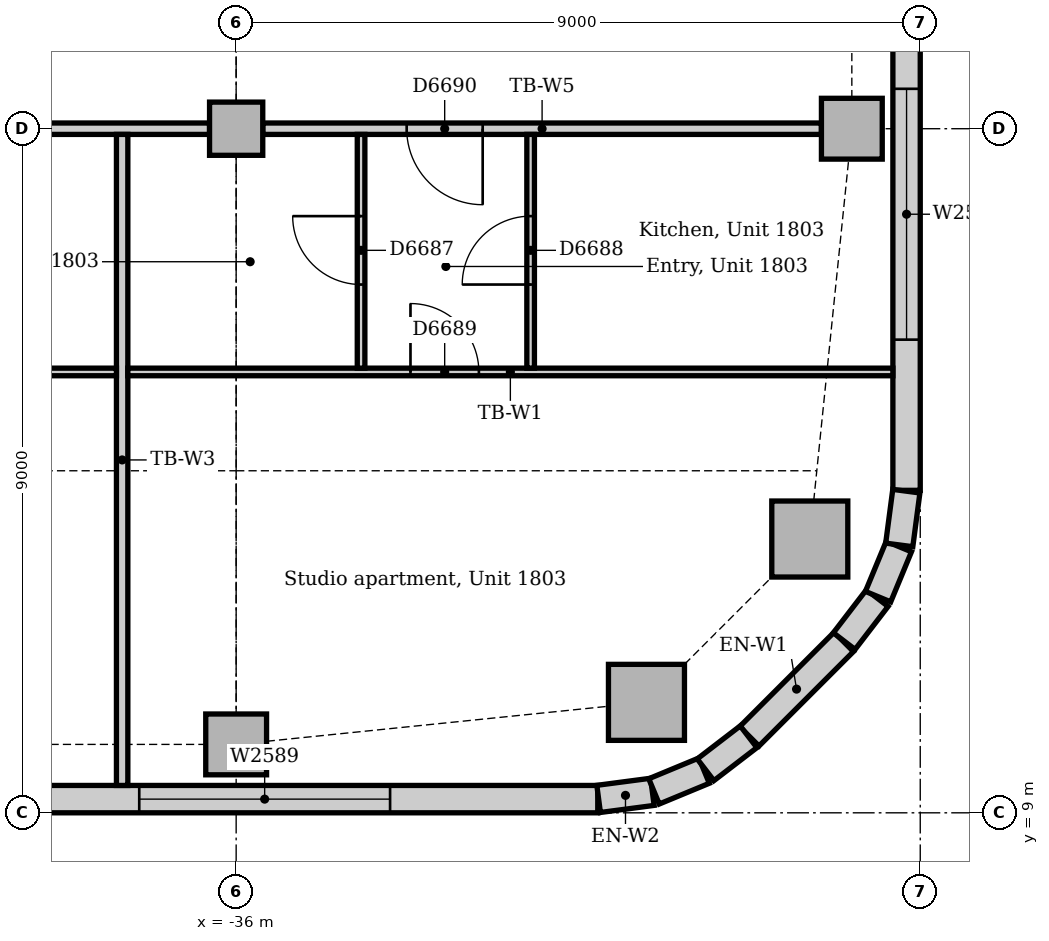
"""IFC4 building model, lengths in metres.
Left out: names, types, materials, properties, quantities, classifications, styles, units other than length and angle.
Written with IfcOpenShell. Run it as: python <this file> out.ifc"""

import sys

from ifc_helpers import new_model, si_unit, direction, frame, frame_2d, origin, origin_2d, place, context, subcontext, project, spatial, rectangle, extrude, element, fill, save


model = new_model("IFC4")
c1 = context("Model", 3, precision=1e-05, world=origin(), true_north=direction((0.0, 1.0)))
c2 = subcontext(c1, "Body", "Model", "MODEL_VIEW")
j1 = project(units=[si_unit("LENGTHUNIT", "METRE"), si_unit("PLANEANGLEUNIT", "RADIAN")], contexts=[c1])
p1 = place(None, origin())
s1 = spatial("IfcSite", under=j1, at=p1, CompositionType="ELEMENT")
p2 = place(p1, origin())
s2 = spatial("IfcBuilding", under=s1, at=p2, CompositionType="ELEMENT")
p3 = place(p2, frame((0.0, 0.0, 79.0)))
s3 = spatial("IfcBuildingStorey", under=s2, at=p3, CompositionType="ELEMENT", Elevation=79.0)
for number, where, z_axis, x_axis in (
    (1, (-30.602, 10.453, 0.0), (0.0, 0.0, 1.0), (1.0, 0.0, 0.0)),
    (2, (-28.453, 12.602, 0.0), (0.0, 0.0, 1.0), (1.0, 0.0, 0.0)),
):
    element("IfcColumn", number, at=place(p3, frame(where, z_axis=z_axis, x_axis=x_axis)), inside=s3, PredefinedType="COLUMN", context=c2, shape_type="SweptSolid", body=[
        extrude(rectangle(XDim=1.0, YDim=1.0, at=origin_2d()), origin(), (0.0, 0.0, 1.0), 3.85),
    ])
for number, where, z_axis, x_axis in (
    (3, (-36.0, 9.9, 0.0), (0.0, 0.0, 1.0), (1.0, 0.0, 0.0)),
    (4, (-27.9, 18.0, 0.0), (0.0, 0.0, 1.0), (1.0, 0.0, 0.0)),
):
    element("IfcColumn", number, at=place(p3, frame(where, z_axis=z_axis, x_axis=x_axis)), inside=s3, PredefinedType="COLUMN", context=c2, shape_type="SweptSolid", body=[
        extrude(rectangle(XDim=0.8, YDim=0.8, at=origin_2d()), origin(), (0.0, 0.0, 1.0), 3.85),
    ])
p4 = place(p3, frame((-36.0, 18.0, 0.0), z_axis=(0.0, 0.0, 1.0), x_axis=(1.0, 0.0, 0.0)))
e5 = element("IfcColumn", 5, at=p4, inside=s3, PredefinedType="COLUMN", context=c2, shape_type="SweptSolid", body=[
    extrude(rectangle(XDim=0.7, YDim=0.7, at=origin_2d()), origin(), (0.0, 0.0, 1.0), 3.85),
])
p5 = place(p3, frame((-55.007, 9.18, 0.0), z_axis=(0.0, 0.0, 1.0), x_axis=(1.0, 0.0, 0.0)))
e6 = element("IfcWall", 6, at=p5, inside=s3, PredefinedType="STANDARD", context=c2, shape_type="SweptSolid", body=[
    extrude(rectangle(XDim=23.765, YDim=0.36, at=frame_2d((11.882, 0.0))), origin(), (0.0, 0.0, 1.0), 3.85),
])
p6 = place(p5, frame((3.482, 0.0, 0.9)))
e7 = element("IfcOpeningElement", 7, at=p6, cuts=e6, PredefinedType="OPENING", context=c2, shape_type="SweptSolid", body=[
    extrude(rectangle(XDim=3.3, YDim=1.6, at=frame_2d((1.65, 0.8))), frame((0.0, 0.19, 0.0), z_axis=(0.0, -1.0, 0.0), x_axis=(1.0, 0.0, 0.0)), (0.0, 0.0, 1.0), 0.38),
])
p7 = place(p5, frame((7.982, 0.0, 0.9)))
e8 = element("IfcOpeningElement", 8, at=p7, cuts=e6, PredefinedType="OPENING", context=c2, shape_type="SweptSolid", body=[
    extrude(rectangle(XDim=3.3, YDim=1.6, at=frame_2d((1.65, 0.8))), frame((0.0, 0.19, 0.0), z_axis=(0.0, -1.0, 0.0), x_axis=(1.0, 0.0, 0.0)), (0.0, 0.0, 1.0), 0.38),
])
p8 = place(p5, frame((12.482, 0.0, 0.9)))
e9 = element("IfcOpeningElement", 9, at=p8, cuts=e6, PredefinedType="OPENING", context=c2, shape_type="SweptSolid", body=[
    extrude(rectangle(XDim=3.3, YDim=1.6, at=frame_2d((1.65, 0.8))), frame((0.0, 0.19, 0.0), z_axis=(0.0, -1.0, 0.0), x_axis=(1.0, 0.0, 0.0)), (0.0, 0.0, 1.0), 0.38),
])
p9 = place(p5, frame((17.732, 0.0, 0.9)))
e10 = element("IfcOpeningElement", 10, at=p9, cuts=e6, PredefinedType="OPENING", context=c2, shape_type="SweptSolid", body=[
    extrude(rectangle(XDim=3.3, YDim=1.6, at=frame_2d((1.65, 0.8))), frame((0.0, 0.19, 0.0), z_axis=(0.0, -1.0, 0.0), x_axis=(1.0, 0.0, 0.0)), (0.0, 0.0, 1.0), 0.38),
])
p10 = place(p3, frame((-29.249, 10.006, 0.0), z_axis=(0.0, 0.0, 1.0), x_axis=(0.707106781187, 0.707106781187, 0.0)))
e11 = element("IfcWall", 11, at=p10, inside=s3, PredefinedType="STANDARD", context=c2, shape_type="SweptSolid", body=[
    extrude(rectangle(XDim=1.757, YDim=0.36, at=frame_2d((0.879, 0.0))), origin(), (0.0, 0.0, 1.0), 3.85),
])
p11 = place(p3, frame((-27.18, 13.243, 0.0), z_axis=(0.0, 0.0, 1.0), x_axis=(0.0, 1.0, 0.0)))
e12 = element("IfcWall", 12, at=p11, inside=s3, PredefinedType="STANDARD", context=c2, shape_type="SweptSolid", body=[
    extrude(rectangle(XDim=7.757, YDim=0.36, at=frame_2d((3.879, 0.0))), origin(), (0.0, 0.0, 1.0), 3.85),
])
p12 = place(p11, frame((1.982, 0.0, 0.9)))
e13 = element("IfcOpeningElement", 13, at=p12, cuts=e12, PredefinedType="OPENING", context=c2, shape_type="SweptSolid", body=[
    extrude(rectangle(XDim=3.3, YDim=1.6, at=frame_2d((1.65, 0.8))), frame((0.0, 0.19, 0.0), z_axis=(0.0, -1.0, 0.0), x_axis=(1.0, 0.0, 0.0)), (0.0, 0.0, 1.0), 0.38),
])
for number, where, z_axis, x_axis in (
    (14, (-31.231, 9.183, 0.0), (0.0, 0.0, 1.0), (0.991, 0.131, 0.0)),
    (15, (-30.503, 9.282, 0.0), (0.0, 0.0, 1.0), (0.924, 0.383, 0.0)),
):
    element("IfcWall", number, at=place(p3, frame(where, z_axis=z_axis, x_axis=x_axis)), inside=s3, PredefinedType="STANDARD", context=c2, shape_type="SweptSolid", body=[
        extrude(rectangle(XDim=0.713, YDim=0.36, at=frame_2d((0.356, 0.0))), origin(), (0.0, 0.0, 1.0), 3.85),
    ])
for number, where, z_axis, x_axis in (
    (16, (-29.825, 9.566, 0.0), (0.0, 0.0, 1.0), (0.793, 0.609, 0.0)),
    (17, (-28.0, 11.259, 0.0), (0.0, 0.0, 1.0), (0.609, 0.793, 0.0)),
):
    element("IfcWall", number, at=place(p3, frame(where, z_axis=z_axis, x_axis=x_axis)), inside=s3, PredefinedType="STANDARD", context=c2, shape_type="SweptSolid", body=[
        extrude(rectangle(XDim=0.713, YDim=0.36, at=frame_2d((0.357, 0.0))), origin(), (0.0, 0.0, 1.0), 3.85),
    ])
for number, where, z_axis, x_axis in (
    (18, (-27.555, 11.844, 0.0), (0.0, 0.0, 1.0), (0.383, 0.924, 0.0)),
    (19, (-27.276, 12.524, 0.0), (0.0, 0.0, 1.0), (0.131, 0.991, 0.0)),
):
    element("IfcWall", number, at=place(p3, frame(where, z_axis=z_axis, x_axis=x_axis)), inside=s3, PredefinedType="STANDARD", context=c2, shape_type="SweptSolid", body=[
        extrude(rectangle(XDim=0.713, YDim=0.36, at=frame_2d((0.356, 0.0))), origin(), (0.0, 0.0, 1.0), 3.85),
    ])
p13 = place(p3, frame((-35.65, 18.0, 0.0), z_axis=(0.0, 0.0, 1.0), x_axis=(1.0, 0.0, 0.0)))
e20 = element("IfcWall", 20, at=p13, inside=s3, PredefinedType="PARTITIONING", context=c2, shape_type="SweptSolid", body=[
    extrude(rectangle(XDim=7.35, YDim=0.15, at=frame_2d((3.675, 0.0))), origin(), (0.0, 0.0, 1.0), 3.158),
])
p14 = place(p13, frame((1.893, 0.0, 0.0)))
e21 = element("IfcOpeningElement", 21, at=p14, cuts=e20, PredefinedType="OPENING", context=c2, shape_type="SweptSolid", body=[
    extrude(rectangle(XDim=1.0, YDim=2.1, at=frame_2d((0.5, 1.05))), frame((0.0, 0.085, 0.0), z_axis=(0.0, -1.0, 0.0), x_axis=(1.0, 0.0, 0.0)), (0.0, 0.0, 1.0), 0.17),
])
p15 = place(p3, frame((-44.65, 18.0, 0.0), z_axis=(0.0, 0.0, 1.0), x_axis=(1.0, 0.0, 0.0)))
e22 = element("IfcWall", 22, at=p15, inside=s3, PredefinedType="PARTITIONING", context=c2, shape_type="SweptSolid", body=[
    extrude(rectangle(XDim=8.3, YDim=0.15, at=frame_2d((4.15, 0.0))), origin(), (0.0, 0.0, 1.0), 3.158),
])
p16 = place(p3, frame((-37.5, 9.36, 0.0), z_axis=(0.0, 0.0, 1.0), x_axis=(0.0, 1.0, 0.0)))
e23 = element("IfcWall", 23, at=p16, inside=s3, PredefinedType="PARTITIONING", context=c2, shape_type="SweptSolid", body=[
    extrude(rectangle(XDim=8.565, YDim=0.15, at=frame_2d((4.282, 0.0))), origin(), (0.0, 0.0, 1.0), 3.85),
])
p17 = place(p3, frame((-55.55, 14.8, 0.0), z_axis=(0.0, 0.0, 1.0), x_axis=(1.0, 0.0, 0.0)))
e24 = element("IfcWall", 24, at=p17, inside=s3, PredefinedType="PARTITIONING", context=c2, shape_type="SweptSolid", body=[
    extrude(rectangle(XDim=17.975, YDim=0.1, at=frame_2d((8.988, 0.0))), origin(), (0.0, 0.0, 1.0), 3.85),
])
p18 = place(p17, frame((7.18, 0.0, 0.0)))
e25 = element("IfcOpeningElement", 25, at=p18, cuts=e24, PredefinedType="OPENING", context=c2, shape_type="SweptSolid", body=[
    extrude(rectangle(XDim=0.9, YDim=2.1, at=frame_2d((0.45, 1.05))), frame((0.0, 0.06, 0.0), z_axis=(0.0, -1.0, 0.0), x_axis=(1.0, 0.0, 0.0)), (0.0, 0.0, 1.0), 0.12),
])
p19 = place(p3, frame((-37.425, 14.8, 0.0), z_axis=(0.0, 0.0, 1.0), x_axis=(1.0, 0.0, 0.0)))
e26 = element("IfcWall", 26, at=p19, inside=s3, PredefinedType="PARTITIONING", context=c2, shape_type="SweptSolid", body=[
    extrude(rectangle(XDim=10.065, YDim=0.1, at=frame_2d((5.032, 0.0))), origin(), (0.0, 0.0, 1.0), 3.85),
])
p20 = place(p19, frame((3.718, 0.0, 0.0)))
e27 = element("IfcOpeningElement", 27, at=p20, cuts=e26, PredefinedType="OPENING", context=c2, shape_type="SweptSolid", body=[
    extrude(rectangle(XDim=0.9, YDim=2.1, at=frame_2d((0.45, 1.05))), frame((0.0, 0.06, 0.0), z_axis=(0.0, -1.0, 0.0), x_axis=(1.0, 0.0, 0.0)), (0.0, 0.0, 1.0), 0.12),
])
p21 = place(p3, frame((-34.357, 14.85, 0.0), z_axis=(0.0, 0.0, 1.0), x_axis=(0.0, 1.0, 0.0)))
e28 = element("IfcWall", 28, at=p21, inside=s3, PredefinedType="PARTITIONING", context=c2, shape_type="SweptSolid", body=[
    extrude(rectangle(XDim=3.075, YDim=0.1, at=frame_2d((1.538, 0.0))), origin(), (0.0, 0.0, 1.0), 3.85),
])
p22 = place(p21, frame((1.1, 0.0, 0.0)))
e29 = element("IfcOpeningElement", 29, at=p22, cuts=e28, PredefinedType="OPENING", context=c2, shape_type="SweptSolid", body=[
    extrude(rectangle(XDim=0.9, YDim=2.1, at=frame_2d((0.45, 1.05))), frame((0.0, 0.06, 0.0), z_axis=(0.0, -1.0, 0.0), x_axis=(1.0, 0.0, 0.0)), (0.0, 0.0, 1.0), 0.12),
])
p23 = place(p3, frame((-32.126, 14.85, 0.0), z_axis=(0.0, 0.0, 1.0), x_axis=(0.0, 1.0, 0.0)))
e30 = element("IfcWall", 30, at=p23, inside=s3, PredefinedType="PARTITIONING", context=c2, shape_type="SweptSolid", body=[
    extrude(rectangle(XDim=3.075, YDim=0.1, at=frame_2d((1.538, 0.0))), origin(), (0.0, 0.0, 1.0), 3.85),
])
p24 = place(p23, frame((1.1, 0.0, 0.0)))
e31 = element("IfcOpeningElement", 31, at=p24, cuts=e30, PredefinedType="OPENING", context=c2, shape_type="SweptSolid", body=[
    extrude(rectangle(XDim=0.9, YDim=2.1, at=frame_2d((0.45, 1.05))), frame((0.0, 0.06, 0.0), z_axis=(0.0, -1.0, 0.0), x_axis=(1.0, 0.0, 0.0)), (0.0, 0.0, 1.0), 0.12),
])
p25 = place(p9, origin())
e32 = element("IfcWindow", 32, at=p25, inside=s3, PartitioningType="SINGLE_PANEL", PredefinedType="WINDOW", context=c2, shape_type="SweptSolid", body=[
    extrude(rectangle(XDim=3.3, YDim=1.6, at=frame_2d((1.65, 0.8))), frame((0.0, 0.13, 0.0), z_axis=(0.0, -1.0, 0.0), x_axis=(1.0, 0.0, 0.0)), (0.0, 0.0, 1.0), 0.06),
])
fill(e10, e32)
p26 = place(p12, origin())
e33 = element("IfcWindow", 33, at=p26, inside=s3, PartitioningType="SINGLE_PANEL", PredefinedType="WINDOW", context=c2, shape_type="SweptSolid", body=[
    extrude(rectangle(XDim=3.3, YDim=1.6, at=frame_2d((1.65, 0.8))), frame((0.0, 0.13, 0.0), z_axis=(0.0, -1.0, 0.0), x_axis=(1.0, 0.0, 0.0)), (0.0, 0.0, 1.0), 0.06),
])
fill(e13, e33)
p27 = place(p22, origin())
e34 = element("IfcDoor", 34, at=p27, inside=s3, OperationType="SINGLE_SWING_RIGHT", PredefinedType="DOOR", context=c2, shape_type="SweptSolid", body=[
    extrude(rectangle(XDim=0.9, YDim=2.1, at=frame_2d((0.45, 1.05))), frame((0.0, 0.025, 0.0), z_axis=(0.0, -1.0, 0.0), x_axis=(1.0, 0.0, 0.0)), (0.0, 0.0, 1.0), 0.05),
])
fill(e29, e34)
p28 = place(p24, origin())
e35 = element("IfcDoor", 35, at=p28, inside=s3, OperationType="SINGLE_SWING_LEFT", PredefinedType="DOOR", context=c2, shape_type="SweptSolid", body=[
    extrude(rectangle(XDim=0.9, YDim=2.1, at=frame_2d((0.45, 1.05))), frame((0.0, 0.025, 0.0), z_axis=(0.0, -1.0, 0.0), x_axis=(1.0, 0.0, 0.0)), (0.0, 0.0, 1.0), 0.05),
])
fill(e31, e35)
p29 = place(p20, origin())
e36 = element("IfcDoor", 36, at=p29, inside=s3, OperationType="SINGLE_SWING_LEFT", PredefinedType="DOOR", context=c2, shape_type="SweptSolid", body=[
    extrude(rectangle(XDim=0.9, YDim=2.1, at=frame_2d((0.45, 1.05))), frame((0.0, 0.025, 0.0), z_axis=(0.0, -1.0, 0.0), x_axis=(1.0, 0.0, 0.0)), (0.0, 0.0, 1.0), 0.05),
])
fill(e27, e36)
p30 = place(p14, frame((1.0, 0.0, 0.0), z_axis=(0.0, 0.0, 1.0), x_axis=(-1.0, 0.0, 0.0)))
e37 = element("IfcDoor", 37, at=p30, inside=s3, OperationType="SINGLE_SWING_LEFT", PredefinedType="DOOR", context=c2, shape_type="SweptSolid", body=[
    extrude(rectangle(XDim=1.0, YDim=2.1, at=frame_2d((0.5, 1.05))), frame((0.0, 0.025, 0.0), z_axis=(0.0, -1.0, 0.0), x_axis=(1.0, 0.0, 0.0)), (0.0, 0.0, 1.0), 0.05),
])
fill(e21, e37)
save(model, sys.argv[1])
